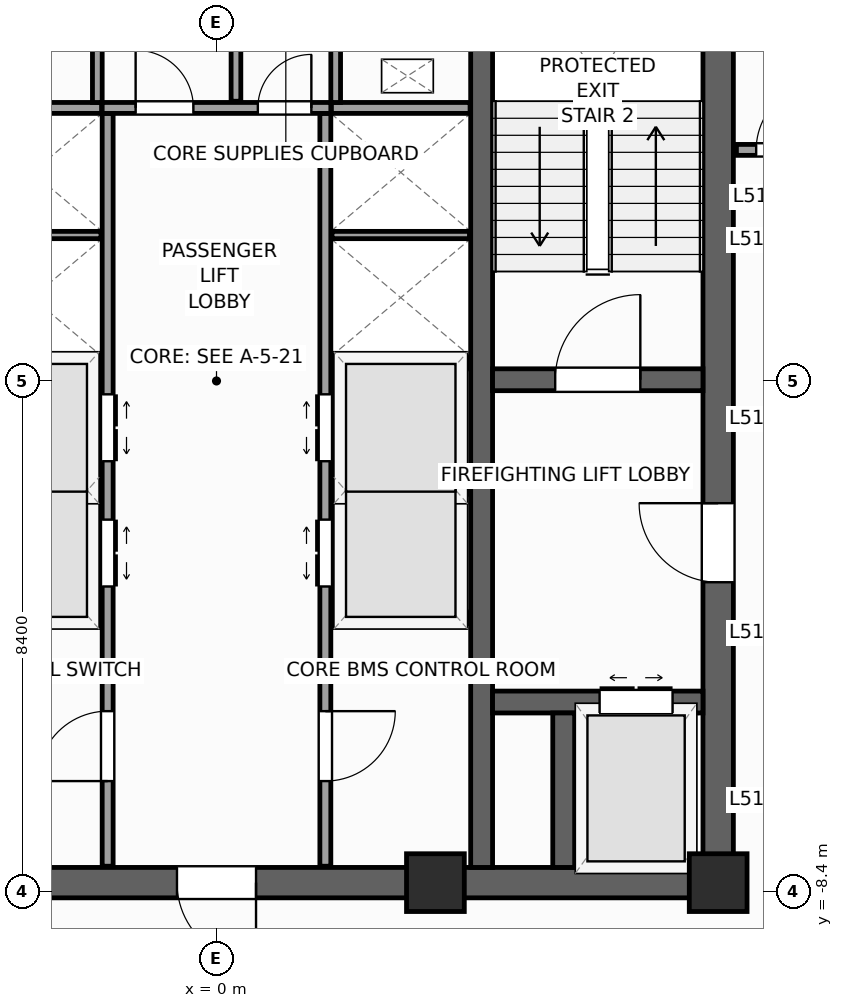
"""IFC4 building model, lengths in metres.
Left out: names, types, materials, properties, quantities, classifications, styles, units other than length and angle.
Written with IfcOpenShell. Run it as: python <this file> out.ifc"""

import sys

from ifc_helpers import new_model, si_unit, direction, frame, frame_2d, origin, origin_2d, place, context, subcontext, project, spatial, rectangle, extrude, source, transform, mapped, element, fill, save


model = new_model("IFC4")
c1 = context("Model", 3, precision=1e-05, world=origin(), true_north=direction((0.0, 1.0)))
c2 = subcontext(c1, "Body", "Model", "MODEL_VIEW")
j1 = project(units=[si_unit("LENGTHUNIT", "METRE"), si_unit("PLANEANGLEUNIT", "RADIAN")], contexts=[c1])
p1 = place(None, origin())
s1 = spatial("IfcSite", under=j1, at=p1, CompositionType="ELEMENT")
p2 = place(p1, origin())
s2 = spatial("IfcBuilding", under=s1, at=p2, CompositionType="ELEMENT")
p3 = place(p2, frame((0.0, 0.0, 213.4)))
s3 = spatial("IfcBuildingStorey", under=s2, at=p3, CompositionType="ELEMENT", Elevation=213.4)
p4 = place(p3, frame((-8.5, -8.25, 0.0), z_axis=(0.0, 0.0, 1.0), x_axis=(1.0, 0.0, 0.0)))
e1 = element("IfcWall", 1, at=p4, inside=s3, PredefinedType="SHEAR", context=c2, shape_type="SweptSolid", body=[
    extrude(rectangle(XDim=17.0, YDim=0.5, at=frame_2d((8.5, 0.0))), origin(), (0.0, 0.0, 1.0), 3.9),
])
p5 = place(p4, frame((7.85, 0.0, 0.0)))
e2 = element("IfcOpeningElement", 2, at=p5, cuts=e1, PredefinedType="OPENING", context=c2, shape_type="SweptSolid", body=[
    extrude(rectangle(XDim=1.3, YDim=2.2, at=frame_2d((0.65, 1.1))), frame((0.0, 0.26, 0.0), z_axis=(0.0, -1.0, 0.0), x_axis=(1.0, 0.0, 0.0)), (0.0, 0.0, 1.0), 0.52),
])
p6 = place(p3, frame((8.25, -8.0, 0.0), z_axis=(0.0, 0.0, 1.0), x_axis=(0.0, 1.0, 0.0)))
e3 = element("IfcWall", 3, at=p6, inside=s3, PredefinedType="SHEAR", context=c2, shape_type="SweptSolid", body=[
    extrude(rectangle(XDim=16.0, YDim=0.5, at=frame_2d((8.0, 0.0))), origin(), (0.0, 0.0, 1.0), 3.9),
])
p7 = place(p6, frame((4.69, 0.0, 0.0)))
e4 = element("IfcOpeningElement", 4, at=p7, cuts=e3, PredefinedType="OPENING", context=c2, shape_type="SweptSolid", body=[
    extrude(rectangle(XDim=1.3, YDim=2.2, at=frame_2d((0.65, 1.1))), frame((0.0, 0.26, 0.0), z_axis=(0.0, -1.0, 0.0), x_axis=(1.0, 0.0, 0.0)), (0.0, 0.0, 1.0), 0.52),
])
p8 = place(p3, frame((4.36, -8.0, 0.0), z_axis=(0.0, 0.0, 1.0), x_axis=(0.0, 1.0, 0.0)))
e5 = element("IfcWall", 5, at=p8, inside=s3, PredefinedType="SHEAR", context=c2, shape_type="SweptSolid", body=[
    extrude(rectangle(XDim=16.0, YDim=0.36, at=frame_2d((8.0, 0.0))), origin(), (0.0, 0.0, 1.0), 3.9),
])
p9 = place(p3, frame((4.54, 0.02, 0.0), z_axis=(0.0, 0.0, 1.0), x_axis=(1.0, 0.0, 0.0)))
e6 = element("IfcWall", 6, at=p9, inside=s3, PredefinedType="SHEAR", context=c2, shape_type="SweptSolid", body=[
    extrude(rectangle(XDim=3.46, YDim=0.36, at=frame_2d((1.73, 0.0))), origin(), (0.0, 0.0, 1.0), 3.9),
])
p10 = place(p9, frame((1.03, 0.0, 0.0)))
e7 = element("IfcOpeningElement", 7, at=p10, cuts=e6, PredefinedType="OPENING", context=c2, shape_type="SweptSolid", body=[
    extrude(rectangle(XDim=1.4, YDim=2.2, at=frame_2d((0.7, 1.1))), frame((0.0, 0.19, 0.0), z_axis=(0.0, -1.0, 0.0), x_axis=(1.0, 0.0, 0.0)), (0.0, 0.0, 1.0), 0.38),
])
p11 = place(p3, frame((4.54, -5.28, 0.0), z_axis=(0.0, 0.0, 1.0), x_axis=(1.0, 0.0, 0.0)))
e8 = element("IfcWall", 8, at=p11, inside=s3, PredefinedType="SHEAR", context=c2, shape_type="SweptSolid", body=[
    extrude(rectangle(XDim=3.46, YDim=0.36, at=frame_2d((1.73, 0.0))), origin(), (0.0, 0.0, 1.0), 3.9),
])
p12 = place(p11, frame((1.76, 0.0, 0.0)))
e9 = element("IfcOpeningElement", 9, at=p12, cuts=e8, PredefinedType="OPENING", context=c2, shape_type="SweptSolid", body=[
    extrude(rectangle(XDim=1.2, YDim=2.25, at=frame_2d((0.6, 1.125))), frame((0.0, 0.19, 0.0), z_axis=(0.0, -1.0, 0.0), x_axis=(1.0, 0.0, 0.0)), (0.0, 0.0, 1.0), 0.38),
])
p13 = place(p3, frame((5.71, -8.0, 0.0), z_axis=(0.0, 0.0, 1.0), x_axis=(0.0, 1.0, 0.0)))
e10 = element("IfcWall", 10, at=p13, inside=s3, PredefinedType="SHEAR", context=c2, shape_type="SweptSolid", body=[
    extrude(rectangle(XDim=2.54, YDim=0.36, at=frame_2d((1.27, 0.0))), origin(), (0.0, 0.0, 1.0), 3.9),
])
m1 = source(origin(), c2, "Body", "SweptSolid", [
    extrude(rectangle(XDim=0.95, YDim=0.95, at=origin_2d()), origin(), (0.0, 0.0, 1.0), 3.9),
])
for number, where, z_axis, x_axis in (
    (11, (8.25, -8.25, 0.0), (0.0, 0.0, 1.0), (1.0, 0.0, 0.0)),
    (12, (3.6, -8.25, 0.0), (0.0, 0.0, 1.0), (1.0, 0.0, 0.0)),
):
    element("IfcColumn", number, at=place(p3, frame(where, z_axis=z_axis, x_axis=x_axis)), inside=s3, PredefinedType="PILASTER", context=c2, shape_type="MappedRepresentation", body=[
        mapped(m1, transform((0.0, 0.0, 0.0), scale=1.0)),
    ])
p14 = place(p3, frame((6.733, -29.154, 0.0), z_axis=(0.0, 0.0, 1.0), x_axis=(0.629325378072, 0.77714192302, 0.0)))
e13 = element("IfcWall", 13, at=p14, inside=s3, PredefinedType="STANDARD", context=c2, shape_type="SweptSolid", body=[
    extrude(rectangle(XDim=36.84, YDim=0.34, at=frame_2d((18.42, 0.0))), origin(), (0.0, 0.0, 1.0), 2.96),
])
p15 = place(p14, frame((12.295, 0.0, 0.0)))
e14 = element("IfcOpeningElement", 14, at=p15, cuts=e13, PredefinedType="OPENING", context=c2, shape_type="SweptSolid", body=[
    extrude(rectangle(XDim=1.05, YDim=2.25, at=frame_2d((0.525, 1.125))), frame((0.0, 0.18, 0.0), z_axis=(0.0, -1.0, 0.0), x_axis=(1.0, 0.0, 0.0)), (0.0, 0.0, 1.0), 0.36),
])
p16 = place(p14, frame((3.721, 0.0, 0.48)))
e15 = element("IfcOpeningElement", 15, at=p16, cuts=e13, PredefinedType="OPENING", context=c2, shape_type="SweptSolid", body=[
    extrude(rectangle(XDim=1.4, YDim=2.4, at=frame_2d((0.7, 1.2))), frame((0.0, 0.18, 0.0), z_axis=(0.0, -1.0, 0.0), x_axis=(1.0, 0.0, 0.0)), (0.0, 0.0, 1.0), 0.36),
])
p17 = place(p14, frame((7.559, 0.0, 0.58)))
e16 = element("IfcOpeningElement", 16, at=p17, cuts=e13, PredefinedType="OPENING", context=c2, shape_type="SweptSolid", body=[
    extrude(rectangle(XDim=1.75, YDim=2.3, at=frame_2d((0.875, 1.15))), frame((0.0, 0.18, 0.0), z_axis=(0.0, -1.0, 0.0), x_axis=(1.0, 0.0, 0.0)), (0.0, 0.0, 1.0), 0.36),
])
p18 = place(p14, frame((16.058, 0.0, 0.58)))
e17 = element("IfcOpeningElement", 17, at=p18, cuts=e13, PredefinedType="OPENING", context=c2, shape_type="SweptSolid", body=[
    extrude(rectangle(XDim=1.75, YDim=2.3, at=frame_2d((0.875, 1.15))), frame((0.0, 0.18, 0.0), z_axis=(0.0, -1.0, 0.0), x_axis=(1.0, 0.0, 0.0)), (0.0, 0.0, 1.0), 0.36),
])
p19 = place(p14, frame((24.176, 0.0, 0.58)))
e18 = element("IfcOpeningElement", 18, at=p19, cuts=e13, PredefinedType="OPENING", context=c2, shape_type="SweptSolid", body=[
    extrude(rectangle(XDim=1.75, YDim=2.3, at=frame_2d((0.875, 1.15))), frame((0.0, 0.18, 0.0), z_axis=(0.0, -1.0, 0.0), x_axis=(1.0, 0.0, 0.0)), (0.0, 0.0, 1.0), 0.36),
])
p20 = place(p14, frame((30.982, 0.0, 0.48)))
e19 = element("IfcOpeningElement", 19, at=p20, cuts=e13, PredefinedType="OPENING", context=c2, shape_type="SweptSolid", body=[
    extrude(rectangle(XDim=1.4, YDim=2.4, at=frame_2d((0.7, 1.2))), frame((0.0, 0.18, 0.0), z_axis=(0.0, -1.0, 0.0), x_axis=(1.0, 0.0, 0.0)), (0.0, 0.0, 1.0), 0.36),
])
p21 = place(p3, frame((-29.154, -6.733, 0.0), z_axis=(0.0, 0.0, 1.0), x_axis=(0.77714192302, -0.629325378072, 0.0)))
e20 = element("IfcWall", 20, at=p21, inside=s3, PredefinedType="STANDARD", context=c2, shape_type="SweptSolid", body=[
    extrude(rectangle(XDim=36.84, YDim=0.34, at=frame_2d((18.42, 0.0))), origin(), (0.0, 0.0, 1.0), 2.96),
])
p22 = place(p21, frame((3.721, 0.0, 0.48)))
e21 = element("IfcOpeningElement", 21, at=p22, cuts=e20, PredefinedType="OPENING", context=c2, shape_type="SweptSolid", body=[
    extrude(rectangle(XDim=1.4, YDim=2.4, at=frame_2d((0.7, 1.2))), frame((0.0, 0.18, 0.0), z_axis=(0.0, -1.0, 0.0), x_axis=(1.0, 0.0, 0.0)), (0.0, 0.0, 1.0), 0.36),
])
p23 = place(p21, frame((9.809, 0.0, 0.58)))
e22 = element("IfcOpeningElement", 22, at=p23, cuts=e20, PredefinedType="OPENING", context=c2, shape_type="SweptSolid", body=[
    extrude(rectangle(XDim=1.75, YDim=2.3, at=frame_2d((0.875, 1.15))), frame((0.0, 0.18, 0.0), z_axis=(0.0, -1.0, 0.0), x_axis=(1.0, 0.0, 0.0)), (0.0, 0.0, 1.0), 0.36),
])
p24 = place(p21, frame((16.058, 0.0, 0.58)))
e23 = element("IfcOpeningElement", 23, at=p24, cuts=e20, PredefinedType="OPENING", context=c2, shape_type="SweptSolid", body=[
    extrude(rectangle(XDim=1.75, YDim=2.3, at=frame_2d((0.875, 1.15))), frame((0.0, 0.18, 0.0), z_axis=(0.0, -1.0, 0.0), x_axis=(1.0, 0.0, 0.0)), (0.0, 0.0, 1.0), 0.36),
])
p25 = place(p21, frame((24.176, 0.0, 0.58)))
e24 = element("IfcOpeningElement", 24, at=p25, cuts=e20, PredefinedType="OPENING", context=c2, shape_type="SweptSolid", body=[
    extrude(rectangle(XDim=1.75, YDim=2.3, at=frame_2d((0.875, 1.15))), frame((0.0, 0.18, 0.0), z_axis=(0.0, -1.0, 0.0), x_axis=(1.0, 0.0, 0.0)), (0.0, 0.0, 1.0), 0.36),
])
p26 = place(p21, frame((30.982, 0.0, 0.48)))
e25 = element("IfcOpeningElement", 25, at=p26, cuts=e20, PredefinedType="OPENING", context=c2, shape_type="SweptSolid", body=[
    extrude(rectangle(XDim=1.4, YDim=2.4, at=frame_2d((0.7, 1.2))), frame((0.0, 0.18, 0.0), z_axis=(0.0, -1.0, 0.0), x_axis=(1.0, 0.0, 0.0)), (0.0, 0.0, 1.0), 0.36),
])
p27 = place(p3, frame((-1.79, -7.98, 0.0), z_axis=(0.0, 0.0, 1.0), x_axis=(0.0, 1.0, 0.0)))
e26 = element("IfcWall", 26, at=p27, inside=s3, PredefinedType="PARTITIONING", context=c2, shape_type="SweptSolid", body=[
    extrude(rectangle(XDim=12.38, YDim=0.18, at=frame_2d((6.19, 0.0))), origin(), (0.0, 0.0, 1.0), 3.66),
])
p28 = place(p27, frame((4.6, 0.0, 0.0)))
e27 = element("IfcOpeningElement", 27, at=p28, cuts=e26, PredefinedType="OPENING", context=c2, shape_type="SweptSolid", body=[
    extrude(rectangle(XDim=1.1, YDim=2.2, at=frame_2d((0.55, 1.1))), frame((0.0, 0.1, 0.0), z_axis=(0.0, -1.0, 0.0), x_axis=(1.0, 0.0, 0.0)), (0.0, 0.0, 1.0), 0.2),
])
p29 = place(p27, frame((6.66, 0.0, 0.0)))
e28 = element("IfcOpeningElement", 28, at=p29, cuts=e26, PredefinedType="OPENING", context=c2, shape_type="SweptSolid", body=[
    extrude(rectangle(XDim=1.1, YDim=2.2, at=frame_2d((0.55, 1.1))), frame((0.0, 0.1, 0.0), z_axis=(0.0, -1.0, 0.0), x_axis=(1.0, 0.0, 0.0)), (0.0, 0.0, 1.0), 0.2),
])
p30 = place(p27, frame((1.4, 0.0, 0.0)))
e29 = element("IfcOpeningElement", 29, at=p30, cuts=e26, PredefinedType="OPENING", context=c2, shape_type="SweptSolid", body=[
    extrude(rectangle(XDim=1.15, YDim=2.25, at=frame_2d((0.575, 1.125))), frame((0.0, 0.1, 0.0), z_axis=(0.0, -1.0, 0.0), x_axis=(1.0, 0.0, 0.0)), (0.0, 0.0, 1.0), 0.2),
])
p31 = place(p3, frame((1.79, -7.98, 0.0), z_axis=(0.0, 0.0, 1.0), x_axis=(0.0, 1.0, 0.0)))
e30 = element("IfcWall", 30, at=p31, inside=s3, PredefinedType="PARTITIONING", context=c2, shape_type="SweptSolid", body=[
    extrude(rectangle(XDim=12.38, YDim=0.18, at=frame_2d((6.19, 0.0))), origin(), (0.0, 0.0, 1.0), 3.66),
])
p32 = place(p31, frame((4.6, 0.0, 0.0)))
e31 = element("IfcOpeningElement", 31, at=p32, cuts=e30, PredefinedType="OPENING", context=c2, shape_type="SweptSolid", body=[
    extrude(rectangle(XDim=1.1, YDim=2.2, at=frame_2d((0.55, 1.1))), frame((0.0, 0.1, 0.0), z_axis=(0.0, -1.0, 0.0), x_axis=(1.0, 0.0, 0.0)), (0.0, 0.0, 1.0), 0.2),
])
p33 = place(p31, frame((6.66, 0.0, 0.0)))
e32 = element("IfcOpeningElement", 32, at=p33, cuts=e30, PredefinedType="OPENING", context=c2, shape_type="SweptSolid", body=[
    extrude(rectangle(XDim=1.1, YDim=2.2, at=frame_2d((0.55, 1.1))), frame((0.0, 0.1, 0.0), z_axis=(0.0, -1.0, 0.0), x_axis=(1.0, 0.0, 0.0)), (0.0, 0.0, 1.0), 0.2),
])
p34 = place(p31, frame((1.4, 0.0, 0.0)))
e33 = element("IfcOpeningElement", 33, at=p34, cuts=e30, PredefinedType="OPENING", context=c2, shape_type="SweptSolid", body=[
    extrude(rectangle(XDim=1.15, YDim=2.25, at=frame_2d((0.575, 1.125))), frame((0.0, 0.1, 0.0), z_axis=(0.0, -1.0, 0.0), x_axis=(1.0, 0.0, 0.0)), (0.0, 0.0, 1.0), 0.2),
])
p35 = place(p3, frame((-1.88, 4.49, 0.0), z_axis=(0.0, 0.0, 1.0), x_axis=(1.0, 0.0, 0.0)))
e34 = element("IfcWall", 34, at=p35, inside=s3, PredefinedType="PARTITIONING", context=c2, shape_type="SweptSolid", body=[
    extrude(rectangle(XDim=3.76, YDim=0.18, at=frame_2d((1.88, 0.0))), origin(), (0.0, 0.0, 1.0), 3.66),
])
p36 = place(p35, frame((0.55, 0.0, 0.0)))
e35 = element("IfcOpeningElement", 35, at=p36, cuts=e34, PredefinedType="OPENING", context=c2, shape_type="SweptSolid", body=[
    extrude(rectangle(XDim=0.95, YDim=2.1, at=frame_2d((0.475, 1.05))), frame((0.0, 0.1, 0.0), z_axis=(0.0, -1.0, 0.0), x_axis=(1.0, 0.0, 0.0)), (0.0, 0.0, 1.0), 0.2),
])
p37 = place(p35, frame((2.56, 0.0, 0.0)))
e36 = element("IfcOpeningElement", 36, at=p37, cuts=e34, PredefinedType="OPENING", context=c2, shape_type="SweptSolid", body=[
    extrude(rectangle(XDim=0.88, YDim=2.1, at=frame_2d((0.44, 1.05))), frame((0.0, 0.1, 0.0), z_axis=(0.0, -1.0, 0.0), x_axis=(1.0, 0.0, 0.0)), (0.0, 0.0, 1.0), 0.2),
])
for number, where, z_axis, x_axis in (
    (37, (-4.17, -3.9, 0.0), (0.0, 0.0, 1.0), (1.0, 0.0, 0.0)),
    (38, (1.89, -3.9, 0.0), (0.0, 0.0, 1.0), (1.0, 0.0, 0.0)),
    (39, (-4.17, 0.3, 0.0), (0.0, 0.0, 1.0), (1.0, 0.0, 0.0)),
    (40, (1.89, 0.3, 0.0), (0.0, 0.0, 1.0), (1.0, 0.0, 0.0)),
    (41, (-4.17, 4.49, 0.0), (0.0, 0.0, 1.0), (1.0, 0.0, 0.0)),
    (42, (1.89, 4.49, 0.0), (0.0, 0.0, 1.0), (1.0, 0.0, 0.0)),
):
    element("IfcWall", number, at=place(p3, frame(where, z_axis=z_axis, x_axis=x_axis)), inside=s3, PredefinedType="PARTITIONING", context=c2, shape_type="SweptSolid", body=[
        extrude(rectangle(XDim=2.28, YDim=0.18, at=frame_2d((1.14, 0.0))), origin(), (0.0, 0.0, 1.0), 3.66),
    ])
for number, where, z_axis, x_axis in (
    (43, (-4.16, -1.8, 0.0), (0.0, 0.0, 1.0), (1.0, 0.0, 0.0)),
    (44, (1.9, -1.8, 0.0), (0.0, 0.0, 1.0), (1.0, 0.0, 0.0)),
    (45, (-4.16, 2.4, 0.0), (0.0, 0.0, 1.0), (1.0, 0.0, 0.0)),
    (46, (1.9, 2.4, 0.0), (0.0, 0.0, 1.0), (1.0, 0.0, 0.0)),
):
    element("IfcWall", number, at=place(p3, frame(where, z_axis=z_axis, x_axis=x_axis)), inside=s3, PredefinedType="PARTITIONING", context=c2, shape_type="SweptSolid", body=[
        extrude(rectangle(XDim=2.26, YDim=0.12, at=frame_2d((1.13, 0.0))), origin(), (0.0, 0.0, 1.0), 3.66),
    ])
for number, where, z_axis, x_axis in (
    (47, (-1.96, 4.58, 0.0), (0.0, 0.0, 1.0), (0.0, 1.0, 0.0)),
    (48, (1.96, 4.58, 0.0), (0.0, 0.0, 1.0), (0.0, 1.0, 0.0)),
):
    element("IfcWall", number, at=place(p3, frame(where, z_axis=z_axis, x_axis=x_axis)), inside=s3, PredefinedType="PARTITIONING", context=c2, shape_type="SweptSolid", body=[
        extrude(rectangle(XDim=3.4, YDim=0.16, at=frame_2d((1.7, 0.0))), origin(), (0.0, 0.0, 1.0), 3.66),
    ])
p38 = place(p3, frame((0.32, 4.6, 0.0), z_axis=(0.0, 0.0, 1.0), x_axis=(0.0, 1.0, 0.0)))
e49 = element("IfcWall", 49, at=p38, inside=s3, PredefinedType="PARTITIONING", context=c2, shape_type="SweptSolid", body=[
    extrude(rectangle(XDim=1.95, YDim=0.16, at=frame_2d((0.975, 0.0))), origin(), (0.0, 0.0, 1.0), 3.66),
])
p39 = place(p3, frame((8.55, 3.8, 0.0), z_axis=(0.0, 0.0, 1.0), x_axis=(1.0, 0.0, 0.0)))
e50 = element("IfcWall", 50, at=p39, inside=s3, PredefinedType="PARTITIONING", context=c2, shape_type="SweptSolid", body=[
    extrude(rectangle(XDim=1.75, YDim=0.18, at=frame_2d((0.875, 0.0))), origin(), (0.0, 0.0, 1.0), 3.66),
])
p40 = place(p39, frame((0.325, 0.0, 0.0)))
e51 = element("IfcOpeningElement", 51, at=p40, cuts=e50, PredefinedType="OPENING", context=c2, shape_type="SweptSolid", body=[
    extrude(rectangle(XDim=1.1, YDim=2.2, at=frame_2d((0.55, 1.1))), frame((0.0, 0.1, 0.0), z_axis=(0.0, -1.0, 0.0), x_axis=(1.0, 0.0, 0.0)), (0.0, 0.0, 1.0), 0.2),
])
m2 = source(origin(), c2, "Body", "SweptSolid", [
    extrude(rectangle(XDim=1.4, YDim=2.2, at=frame_2d((0.7, 1.1))), frame((0.0, 0.025, 0.0), z_axis=(0.0, -1.0, 0.0), x_axis=(1.0, 0.0, 0.0)), (0.0, 0.0, 1.0), 0.05),
])
p41 = place(p10, origin())
e52 = element("IfcDoor", 52, at=p41, inside=s3, OperationType="SINGLE_SWING_RIGHT", PredefinedType="DOOR", context=c2, shape_type="MappedRepresentation", body=[
    mapped(m2, transform((0.0, 0.0, 0.0), scale=1.0)),
])
fill(e7, e52)
m3 = source(origin(), c2, "Body", "SweptSolid", [
    extrude(rectangle(XDim=1.3, YDim=2.2, at=frame_2d((0.65, 1.1))), frame((0.0, 0.025, 0.0), z_axis=(0.0, -1.0, 0.0), x_axis=(1.0, 0.0, 0.0)), (0.0, 0.0, 1.0), 0.05),
])
p42 = place(p7, origin())
e53 = element("IfcDoor", 53, at=p42, inside=s3, OperationType="SINGLE_SWING_RIGHT", PredefinedType="DOOR", context=c2, shape_type="MappedRepresentation", body=[
    mapped(m3, transform((0.0, 0.0, 0.0), scale=1.0)),
])
fill(e4, e53)
p43 = place(p5, frame((1.3, 0.0, 0.0), z_axis=(0.0, 0.0, 1.0), x_axis=(-1.0, 0.0, 0.0)))
e54 = element("IfcDoor", 54, at=p43, inside=s3, OperationType="SINGLE_SWING_RIGHT", PredefinedType="DOOR", context=c2, shape_type="MappedRepresentation", body=[
    mapped(m3, transform((0.0, 0.0, 0.0), scale=1.0)),
])
fill(e2, e54)
m4 = source(origin(), c2, "Body", "SweptSolid", [
    extrude(rectangle(XDim=1.2, YDim=2.25, at=frame_2d((0.6, 1.125))), frame((0.0, 0.025, 0.0), z_axis=(0.0, -1.0, 0.0), x_axis=(1.0, 0.0, 0.0)), (0.0, 0.0, 1.0), 0.05),
])
p44 = place(p12, origin())
e55 = element("IfcDoor", 55, at=p44, inside=s3, OperationType="DOUBLE_DOOR_SLIDING", PredefinedType="DOOR", context=c2, shape_type="MappedRepresentation", body=[
    mapped(m4, transform((0.0, 0.0, 0.0), scale=1.0)),
])
fill(e9, e55)
m5 = source(origin(), c2, "Body", "SweptSolid", [
    extrude(rectangle(XDim=1.1, YDim=2.2, at=frame_2d((0.55, 1.1))), frame((0.0, 0.025, 0.0), z_axis=(0.0, -1.0, 0.0), x_axis=(1.0, 0.0, 0.0)), (0.0, 0.0, 1.0), 0.05),
])
p45 = place(p28, frame((1.1, 0.0, 0.0), z_axis=(0.0, 0.0, 1.0), x_axis=(-1.0, 0.0, 0.0)))
e56 = element("IfcDoor", 56, at=p45, inside=s3, OperationType="DOUBLE_DOOR_SLIDING", PredefinedType="DOOR", context=c2, shape_type="MappedRepresentation", body=[
    mapped(m5, transform((0.0, 0.0, 0.0), scale=1.0)),
])
fill(e27, e56)
p46 = place(p29, frame((1.1, 0.0, 0.0), z_axis=(0.0, 0.0, 1.0), x_axis=(-1.0, 0.0, 0.0)))
e57 = element("IfcDoor", 57, at=p46, inside=s3, OperationType="DOUBLE_DOOR_SLIDING", PredefinedType="DOOR", context=c2, shape_type="MappedRepresentation", body=[
    mapped(m5, transform((0.0, 0.0, 0.0), scale=1.0)),
])
fill(e28, e57)
p47 = place(p32, origin())
e58 = element("IfcDoor", 58, at=p47, inside=s3, OperationType="DOUBLE_DOOR_SLIDING", PredefinedType="DOOR", context=c2, shape_type="MappedRepresentation", body=[
    mapped(m5, transform((0.0, 0.0, 0.0), scale=1.0)),
])
fill(e31, e58)
p48 = place(p33, origin())
e59 = element("IfcDoor", 59, at=p48, inside=s3, OperationType="DOUBLE_DOOR_SLIDING", PredefinedType="DOOR", context=c2, shape_type="MappedRepresentation", body=[
    mapped(m5, transform((0.0, 0.0, 0.0), scale=1.0)),
])
fill(e32, e59)
m6 = source(origin(), c2, "Body", "SweptSolid", [
    extrude(rectangle(XDim=1.15, YDim=2.25, at=frame_2d((0.575, 1.125))), frame((0.0, 0.025, 0.0), z_axis=(0.0, -1.0, 0.0), x_axis=(1.0, 0.0, 0.0)), (0.0, 0.0, 1.0), 0.05),
])
p49 = place(p30, origin())
e60 = element("IfcDoor", 60, at=p49, inside=s3, OperationType="SINGLE_SWING_LEFT", PredefinedType="DOOR", context=c2, shape_type="MappedRepresentation", body=[
    mapped(m6, transform((0.0, 0.0, 0.0), scale=1.0)),
])
fill(e29, e60)
p50 = place(p34, frame((1.15, 0.0, 0.0), z_axis=(0.0, 0.0, 1.0), x_axis=(-1.0, 0.0, 0.0)))
e61 = element("IfcDoor", 61, at=p50, inside=s3, OperationType="SINGLE_SWING_RIGHT", PredefinedType="DOOR", context=c2, shape_type="MappedRepresentation", body=[
    mapped(m6, transform((0.0, 0.0, 0.0), scale=1.0)),
])
fill(e33, e61)
m7 = source(origin(), c2, "Body", "SweptSolid", [
    extrude(rectangle(XDim=0.95, YDim=2.1, at=frame_2d((0.475, 1.05))), frame((0.0, 0.025, 0.0), z_axis=(0.0, -1.0, 0.0), x_axis=(1.0, 0.0, 0.0)), (0.0, 0.0, 1.0), 0.05),
])
p51 = place(p36, origin())
e62 = element("IfcDoor", 62, at=p51, inside=s3, OperationType="SINGLE_SWING_LEFT", PredefinedType="DOOR", context=c2, shape_type="MappedRepresentation", body=[
    mapped(m7, transform((0.0, 0.0, 0.0), scale=1.0)),
])
fill(e35, e62)
m8 = source(origin(), c2, "Body", "SweptSolid", [
    extrude(rectangle(XDim=0.88, YDim=2.1, at=frame_2d((0.44, 1.05))), frame((0.0, 0.025, 0.0), z_axis=(0.0, -1.0, 0.0), x_axis=(1.0, 0.0, 0.0)), (0.0, 0.0, 1.0), 0.05),
])
p52 = place(p37, origin())
e63 = element("IfcDoor", 63, at=p52, inside=s3, OperationType="SINGLE_SWING_RIGHT", PredefinedType="DOOR", context=c2, shape_type="MappedRepresentation", body=[
    mapped(m8, transform((0.0, 0.0, 0.0), scale=1.0)),
])
fill(e36, e63)
p53 = place(p40, origin())
e64 = element("IfcDoor", 64, at=p53, inside=s3, OperationType="SINGLE_SWING_RIGHT", PredefinedType="DOOR", context=c2, shape_type="MappedRepresentation", body=[
    mapped(m5, transform((0.0, 0.0, 0.0), scale=1.0)),
])
fill(e51, e64)
save(model, sys.argv[1])
